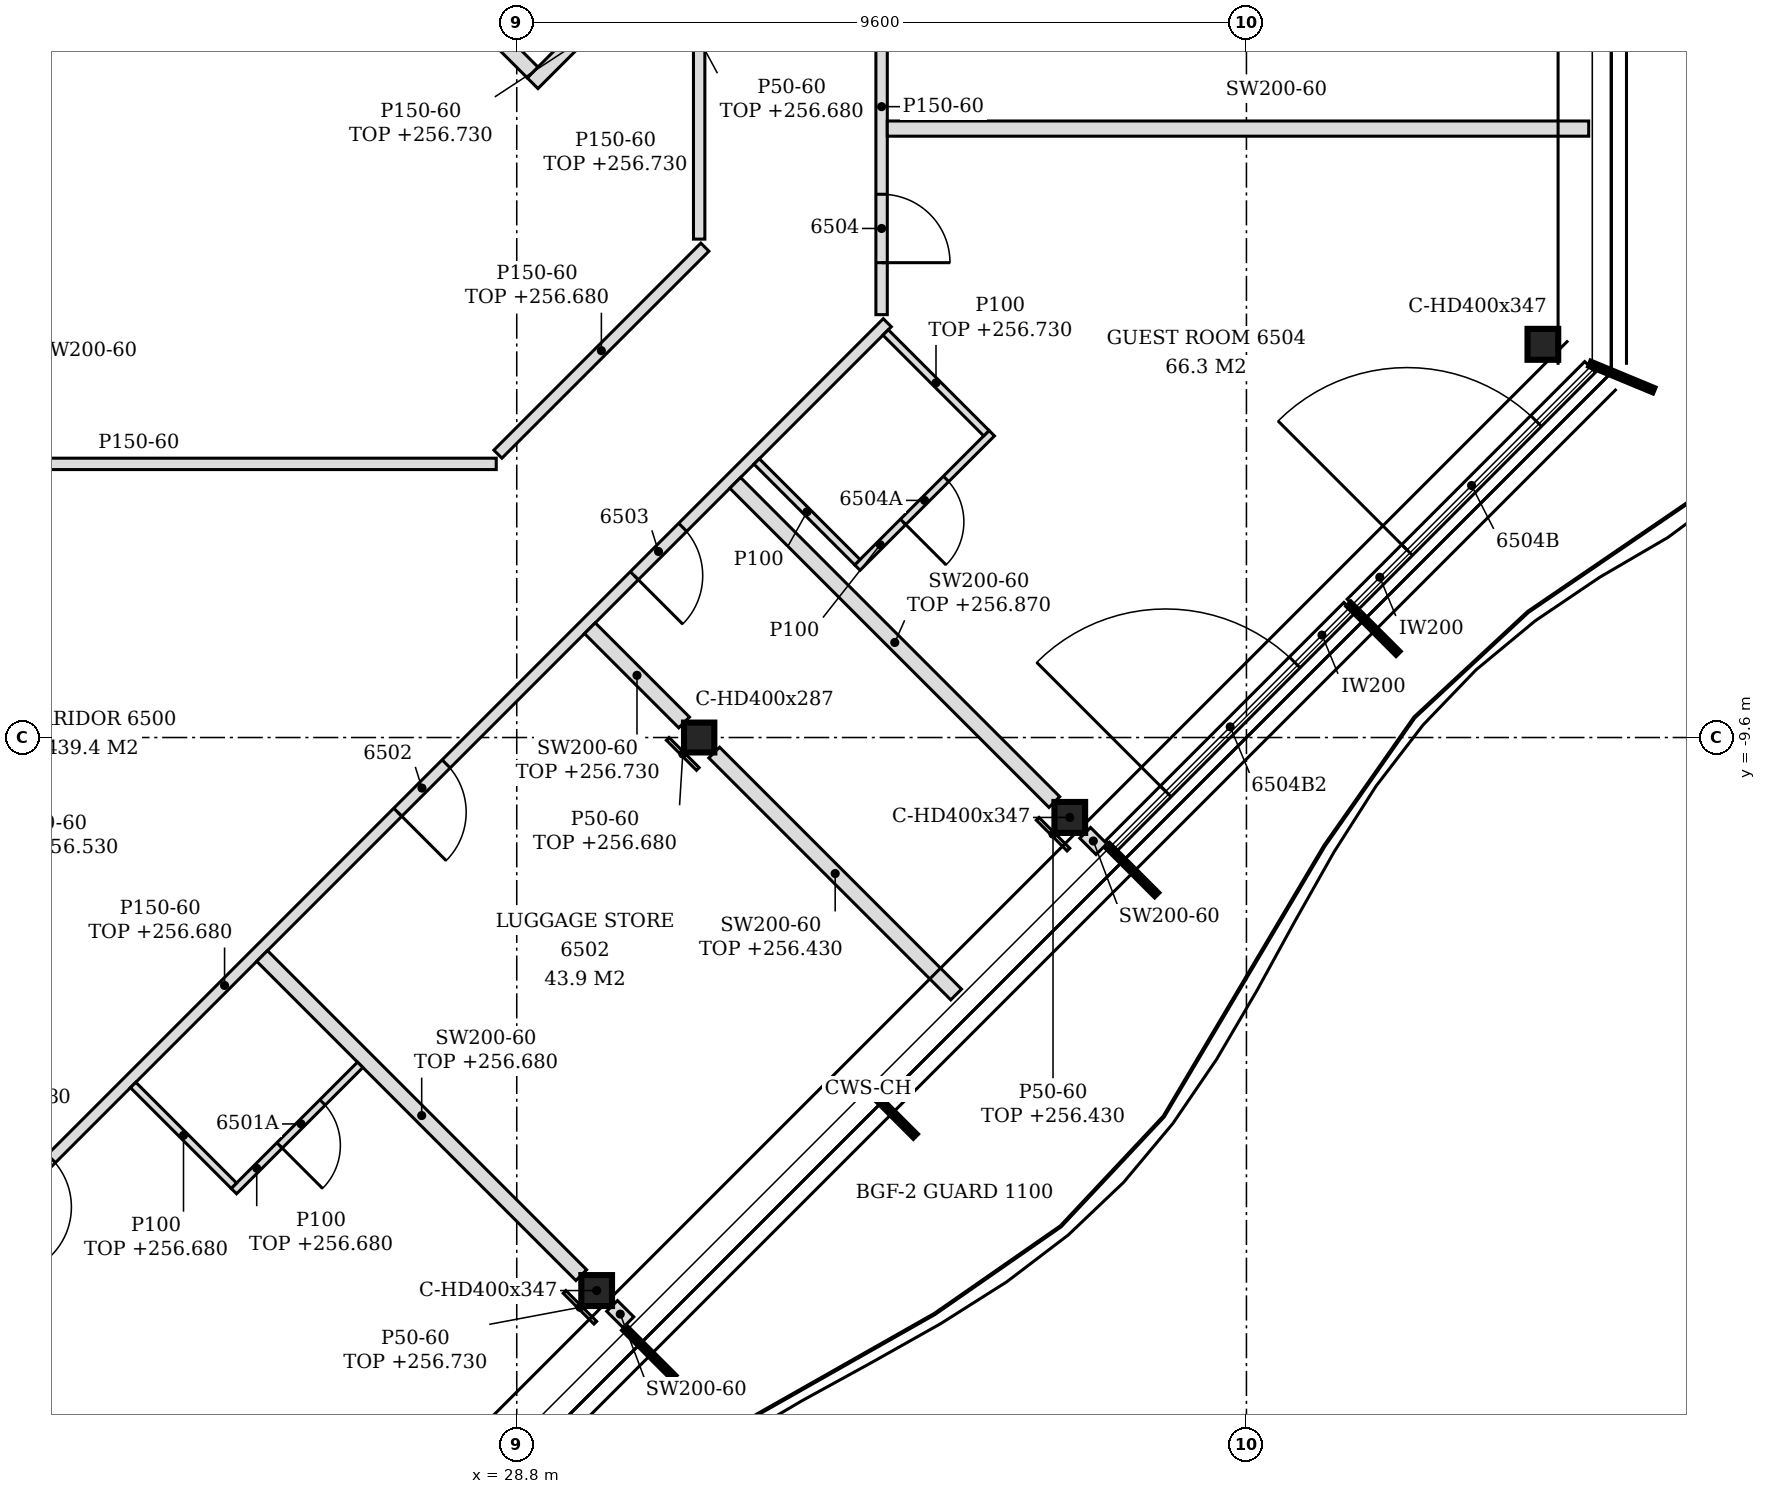
"""IFC4 building model, lengths in metres.
Left out: names, types, materials, properties, quantities, classifications, styles, units other than length and angle.
Written with IfcOpenShell. Run it as: python <this file> out.ifc"""

import sys

from ifc_helpers import new_model, si_unit, direction, frame, frame_2d, origin, origin_2d, place, context, subcontext, project, spatial, polyline, rectangle, i_section, outline, extrude, element, fill, save


model = new_model("IFC4")
c1 = context("Model", 3, precision=1e-05, world=origin(), true_north=direction((0.0, 1.0)))
c2 = subcontext(c1, "Body", "Model", "MODEL_VIEW")
j1 = project(units=[si_unit("LENGTHUNIT", "METRE"), si_unit("PLANEANGLEUNIT", "RADIAN")], contexts=[c1])
p1 = place(None, origin())
s1 = spatial("IfcSite", under=j1, at=p1, CompositionType="ELEMENT")
p2 = place(p1, origin())
s2 = spatial("IfcBuilding", under=s1, at=p2, CompositionType="ELEMENT")
p3 = place(p2, frame((0.0, 0.0, 253.8)))
s3 = spatial("IfcBuildingStorey", under=s2, at=p3, CompositionType="ELEMENT", Elevation=253.8)
for number, where, z_axis, x_axis in (
    (1, (29.852, -16.876, -0.15), (0.0, 0.0, 1.0), (1.0, 0.0, 0.0)),
    (2, (36.076, -10.652, -0.15), (0.0, 0.0, 1.0), (1.0, 0.0, 0.0)),
    (3, (42.3, -4.427, -0.15), (0.0, 0.0, 1.0), (1.0, 0.0, 0.0)),
):
    element("IfcColumn", number, at=place(p3, frame(where, z_axis=z_axis, x_axis=x_axis)), inside=s3, PredefinedType="COLUMN", context=c2, shape_type="SweptSolid", body=[
        extrude(i_section(OverallWidth=0.404, OverallDepth=0.407, WebThickness=0.027, FlangeThickness=0.044, FilletRadius=0.015, at=origin_2d()), origin(), (0.0, 0.0, 1.0), 3.6),
    ])
p4 = place(p3, frame((31.2, -9.6, -0.15), z_axis=(0.0, 0.0, 1.0), x_axis=(1.0, 0.0, 0.0)))
e4 = element("IfcColumn", 4, at=p4, inside=s3, PredefinedType="COLUMN", context=c2, shape_type="SweptSolid", body=[
    extrude(i_section(OverallWidth=0.399, OverallDepth=0.393, WebThickness=0.023, FlangeThickness=0.037, FilletRadius=0.015, at=origin_2d()), origin(), (0.0, 0.0, 1.0), 3.6),
])
p5 = place(p3, frame((36.62, -11.026, 0.0), z_axis=(0.0, 0.0, 1.0), x_axis=(0.707106781187, 0.707106781187, 0.0)))
e5 = element("IfcWall", 5, at=p5, inside=s3, PredefinedType="NOTDEFINED", context=c2, shape_type="SweptSolid", body=[
    extrude(rectangle(XDim=4.431, YDim=0.2, at=frame_2d((2.215, 0.0))), origin(), (0.0, 0.0, 1.0), 3.45),
])
p6 = place(p5, frame((1.015, 0.0, 0.0)))
e6 = element("IfcOpeningElement", 6, at=p6, cuts=e5, PredefinedType="OPENING", context=c2, shape_type="SweptSolid", body=[
    extrude(rectangle(XDim=2.4, YDim=2.4, at=frame_2d((1.2, 1.2))), frame((0.0, 0.11, 0.0), z_axis=(0.0, -1.0, 0.0), x_axis=(1.0, 0.0, 0.0)), (0.0, 0.0, 1.0), 0.22),
])
p7 = place(p3, frame((39.796, -7.851, 0.0), z_axis=(0.0, 0.0, 1.0), x_axis=(0.707079168996, 0.707134392299, 0.0)))
e7 = element("IfcWall", 7, at=p7, inside=s3, PredefinedType="NOTDEFINED", context=c2, shape_type="SweptSolid", body=[
    extrude(rectangle(XDim=4.421, YDim=0.2, at=frame_2d((2.21, 0.0))), origin(), (0.0, 0.0, 1.0), 3.45),
])
p8 = place(p7, frame((1.015, 0.0, 0.0)))
e8 = element("IfcOpeningElement", 8, at=p8, cuts=e7, PredefinedType="OPENING", context=c2, shape_type="SweptSolid", body=[
    extrude(rectangle(XDim=2.4, YDim=2.4, at=frame_2d((1.2, 1.2))), frame((0.0, 0.11, 0.0), z_axis=(0.0, -1.0, 0.0), x_axis=(1.0, 0.0, 0.0)), (0.0, 0.0, 1.0), 0.22),
])
p9 = place(p3, frame((30.269, -17.293, 0.0), z_axis=(0.0, 0.0, 1.0), x_axis=(-0.707509117806, 0.706704215511, 0.0)))
e9 = element("IfcWall", 9, at=p9, inside=s3, PredefinedType="PARTITIONING", context=c2, shape_type="SweptSolid", body=[
    extrude(rectangle(XDim=0.303, YDim=0.2, at=frame_2d((0.152, 0.0))), origin(), (0.0, 0.0, 1.0), 3.45),
])
p10 = place(p3, frame((21.146, -16.672, 0.0), z_axis=(0.0, 0.0, 1.0), x_axis=(0.707106781187, 0.707106781187, 0.0)))
e10 = element("IfcWall", 10, at=p10, inside=s3, PredefinedType="PARTITIONING", context=c2, shape_type="SweptSolid", body=[
    extrude(rectangle(XDim=17.719, YDim=0.15, at=frame_2d((8.859, 0.0))), origin(), (0.0, 0.0, 1.0), 2.88),
])
p11 = place(p10, frame((1.266, 0.0, 0.0)))
e11 = element("IfcOpeningElement", 11, at=p11, cuts=e10, PredefinedType="OPENING", context=c2, shape_type="SweptSolid", body=[
    extrude(rectangle(XDim=0.9, YDim=2.1, at=frame_2d((0.45, 1.05))), frame((0.0, 0.085, 0.0), z_axis=(0.0, -1.0, 0.0), x_axis=(1.0, 0.0, 0.0)), (0.0, 0.0, 1.0), 0.17),
])
p12 = place(p10, frame((8.611, 0.0, 0.0)))
e12 = element("IfcOpeningElement", 12, at=p12, cuts=e10, PredefinedType="OPENING", context=c2, shape_type="SweptSolid", body=[
    extrude(rectangle(XDim=0.9, YDim=2.1, at=frame_2d((0.45, 1.05))), frame((0.0, 0.085, 0.0), z_axis=(0.0, -1.0, 0.0), x_axis=(1.0, 0.0, 0.0)), (0.0, 0.0, 1.0), 0.17),
])
p13 = place(p10, frame((13.012, 0.0, 0.0)))
e13 = element("IfcOpeningElement", 13, at=p13, cuts=e10, PredefinedType="OPENING", context=c2, shape_type="SweptSolid", body=[
    extrude(rectangle(XDim=0.9, YDim=2.1, at=frame_2d((0.45, 1.05))), frame((0.0, 0.085, 0.0), z_axis=(0.0, -1.0, 0.0), x_axis=(1.0, 0.0, 0.0)), (0.0, 0.0, 1.0), 0.17),
])
p14 = place(p3, frame((29.649, -16.673, 0.0), z_axis=(0.0, 0.0, 1.0), x_axis=(-0.70712733811, 0.707086223665, 0.0)))
e14 = element("IfcWall", 14, at=p14, inside=s3, PredefinedType="PARTITIONING", context=c2, shape_type="SweptSolid", body=[
    extrude(rectangle(XDim=5.938, YDim=0.2, at=frame_2d((2.969, 0.0))), origin(), (0.0, 0.0, 1.0), 2.88),
])
p15 = place(p3, frame((25.079, -15.567, 0.0), z_axis=(0.0, 0.0, 1.0), x_axis=(0.707106781187, 0.707106781187, 0.0)))
e15 = element("IfcWall", 15, at=p15, inside=s3, PredefinedType="PARTITIONING", context=c2, shape_type="SweptSolid", body=[
    extrude(rectangle(XDim=2.35, YDim=0.1, at=frame_2d((1.175, 0.0))), origin(), (0.0, 0.0, 1.0), 2.88),
])
p16 = place(p15, frame((0.85, 0.0, 0.0)))
e16 = element("IfcOpeningElement", 16, at=p16, cuts=e15, PredefinedType="OPENING", context=c2, shape_type="SweptSolid", body=[
    extrude(rectangle(XDim=0.8, YDim=2.1, at=frame_2d((0.4, 1.05))), frame((0.0, 0.06, 0.0), z_axis=(0.0, -1.0, 0.0), x_axis=(1.0, 0.0, 0.0)), (0.0, 0.0, 1.0), 0.12),
])
p17 = place(p3, frame((25.079, -15.497, 0.0), z_axis=(0.0, 0.0, 1.0), x_axis=(-0.707106781187, 0.707106781187, 0.0)))
e17 = element("IfcWall", 17, at=p17, inside=s3, PredefinedType="PARTITIONING", context=c2, shape_type="SweptSolid", body=[
    extrude(rectangle(XDim=1.875, YDim=0.1, at=frame_2d((0.938, 0.0))), origin(), (0.0, 0.0, 1.0), 2.88),
])
p18 = place(p3, frame((34.581, -12.981, 0.0), z_axis=(0.0, 0.0, 1.0), x_axis=(-0.707133900936, 0.707079660397, 0.0)))
e18 = element("IfcWall", 18, at=p18, inside=s3, PredefinedType="PARTITIONING", context=c2, shape_type="SweptSolid", body=[
    extrude(rectangle(XDim=4.501, YDim=0.2, at=frame_2d((2.25, 0.0))), origin(), (0.0, 0.0, 1.0), 2.63),
])
p19 = place(p3, frame((36.493, -11.069, 0.0), z_axis=(0.0, 0.0, 1.0), x_axis=(-0.707106781187, 0.707106781187, 0.0)))
e19 = element("IfcWall", 19, at=p19, inside=s3, PredefinedType="PARTITIONING", context=c2, shape_type="SweptSolid", body=[
    extrude(rectangle(XDim=0.303, YDim=0.2, at=frame_2d((0.152, 0.0))), origin(), (0.0, 0.0, 1.0), 3.45),
])
p20 = place(p3, frame((35.873, -10.449, 0.0), z_axis=(0.0, 0.0, 1.0), x_axis=(-0.707086223665, 0.70712733811, 0.0)))
e20 = element("IfcWall", 20, at=p20, inside=s3, PredefinedType="PARTITIONING", context=c2, shape_type="SweptSolid", body=[
    extrude(rectangle(XDim=5.938, YDim=0.2, at=frame_2d((2.969, 0.0))), origin(), (0.0, 0.0, 1.0), 3.07),
])
p21 = place(p3, frame((31.002, -9.402, 0.0), z_axis=(0.0, 0.0, 1.0), x_axis=(-0.707106781187, 0.707106781187, 0.0)))
e21 = element("IfcWall", 21, at=p21, inside=s3, PredefinedType="PARTITIONING", context=c2, shape_type="SweptSolid", body=[
    extrude(rectangle(XDim=1.754, YDim=0.2, at=frame_2d((0.877, 0.0))), origin(), (0.0, 0.0, 1.0), 2.93),
])
p22 = place(p3, frame((33.281, -7.365, 0.0), z_axis=(0.0, 0.0, 1.0), x_axis=(0.707106781187, 0.707106781187, 0.0)))
e22 = element("IfcWall", 22, at=p22, inside=s3, PredefinedType="PARTITIONING", context=c2, shape_type="SweptSolid", body=[
    extrude(rectangle(XDim=2.5, YDim=0.1, at=frame_2d((1.25, 0.0))), origin(), (0.0, 0.0, 1.0), 3.45),
])
p23 = place(p22, frame((0.85, 0.0, 0.0)))
e23 = element("IfcOpeningElement", 23, at=p23, cuts=e22, PredefinedType="OPENING", context=c2, shape_type="SweptSolid", body=[
    extrude(rectangle(XDim=0.8, YDim=2.1, at=frame_2d((0.4, 1.05))), frame((0.0, 0.06, 0.0), z_axis=(0.0, -1.0, 0.0), x_axis=(1.0, 0.0, 0.0)), (0.0, 0.0, 1.0), 0.12),
])
p24 = place(p3, frame((33.281, -7.294, 0.0), z_axis=(0.0, 0.0, 1.0), x_axis=(-0.707041661071, 0.707171895306, 0.0)))
e24 = element("IfcWall", 24, at=p24, inside=s3, PredefinedType="PARTITIONING", context=c2, shape_type="SweptSolid", body=[
    extrude(rectangle(XDim=1.875, YDim=0.1, at=frame_2d((0.937, 0.0))), origin(), (0.0, 0.0, 1.0), 3.45),
])
p25 = place(p3, frame((19.125, -6.0, 0.0), z_axis=(0.0, 0.0, 1.0), x_axis=(1.0, 0.0, 0.0)))
e25 = element("IfcWall", 25, at=p25, inside=s3, PredefinedType="PARTITIONING", context=c2, shape_type="SweptSolid", body=[
    extrude(outline(polyline([(0.0, 0.0), (9.405, 0.0), (9.405, 3.45), (0.225, 3.45), (0.223, 2.83), (0.0, 2.83), (0.0, 0.0)])), frame((0.0, 0.075, 0.0), z_axis=(0.0, -1.0, 0.0), x_axis=(1.0, 0.0, 0.0)), (0.0, 0.0, 1.0), 0.15),
])
p26 = place(p3, frame((28.552, -5.872, 0.0), z_axis=(0.0, 0.0, 1.0), x_axis=(0.707075081602, 0.70713847935, 0.0)))
e26 = element("IfcWall", 26, at=p26, inside=s3, PredefinedType="PARTITIONING", context=c2, shape_type="SweptSolid", body=[
    extrude(rectangle(XDim=3.851, YDim=0.15, at=frame_2d((1.925, 0.0))), origin(), (0.0, 0.0, 1.0), 2.88),
])
p27 = place(p3, frame((34.979, -5.597, 0.0), z_axis=(0.0, 0.0, 1.0), x_axis=(-0.707041661071, 0.707171895306, 0.0)))
e27 = element("IfcWall", 27, at=p27, inside=s3, PredefinedType="PARTITIONING", context=c2, shape_type="SweptSolid", body=[
    extrude(rectangle(XDim=1.875, YDim=0.1, at=frame_2d((0.937, 0.0))), origin(), (0.0, 0.0, 1.0), 2.93),
])
p28 = place(p3, frame((33.6, -4.037, 0.0), z_axis=(0.0, 0.0, 1.0), x_axis=(0.0, 1.0, 0.0)))
e28 = element("IfcWall", 28, at=p28, inside=s3, PredefinedType="PARTITIONING", context=c2, shape_type="SweptSolid", body=[
    extrude(outline(polyline([(0.0, 0.0), (6.337, 0.0), (6.337, 3.45), (4.142, 3.45), (4.14, 2.88), (3.932, 2.88), (3.93, 3.45), (0.0, 3.45), (0.0, 0.0)])), frame((0.0, 0.075, 0.0), z_axis=(0.0, -1.0, 0.0), x_axis=(1.0, 0.0, 0.0)), (0.0, 0.0, 1.0), 0.15),
])
p29 = place(p28, frame((0.684, 0.0, 0.0)))
e29 = element("IfcOpeningElement", 29, at=p29, cuts=e28, PredefinedType="OPENING", context=c2, shape_type="SweptSolid", body=[
    extrude(rectangle(XDim=0.9, YDim=2.1, at=frame_2d((0.45, 1.05))), frame((0.0, 0.085, 0.0), z_axis=(0.0, -1.0, 0.0), x_axis=(1.0, 0.0, 0.0)), (0.0, 0.0, 1.0), 0.17),
])
p30 = place(p28, frame((3.889, 0.0, 0.0)))
e30 = element("IfcOpeningElement", 30, at=p30, cuts=e28, PredefinedType="OPENING", context=c2, shape_type="SweptSolid", body=[
    extrude(rectangle(XDim=0.9, YDim=2.1, at=frame_2d((0.45, 1.05))), frame((0.0, 0.085, 0.0), z_axis=(0.0, -1.0, 0.0), x_axis=(1.0, 0.0, 0.0)), (0.0, 0.0, 1.0), 0.17),
])
p31 = place(p3, frame((31.2, -3.043, 0.0), z_axis=(0.0, 0.0, 1.0), x_axis=(0.0, 1.0, 0.0)))
e31 = element("IfcWall", 31, at=p31, inside=s3, PredefinedType="PARTITIONING", context=c2, shape_type="SweptSolid", body=[
    extrude(rectangle(XDim=2.846, YDim=0.15, at=frame_2d((1.423, 0.0))), origin(), (0.0, 0.0, 1.0), 2.93),
])
p32 = place(p3, frame((33.675, -1.589, 0.0), z_axis=(0.0, 0.0, 1.0), x_axis=(1.0, 0.0, 0.0)))
e32 = element("IfcWall", 32, at=p32, inside=s3, PredefinedType="PARTITIONING", context=c2, shape_type="SweptSolid", body=[
    extrude(outline(polyline([(0.0, 0.0), (9.228, 0.0), (9.228, 3.45), (8.775, 3.45), (8.773, 2.93), (8.475, 2.93), (8.473, 3.45), (0.0, 3.45), (0.0, 0.0)])), frame((0.0, 0.1, 0.0), z_axis=(0.0, -1.0, 0.0), x_axis=(1.0, 0.0, 0.0)), (0.0, 0.0, 1.0), 0.2),
])
p33 = place(p3, frame((29.008, -0.992, 0.0), z_axis=(0.0, 0.0, 1.0), x_axis=(0.707106781187, 0.707106781187, 0.0)))
e33 = element("IfcWall", 33, at=p33, inside=s3, PredefinedType="PARTITIONING", context=c2, shape_type="SweptSolid", body=[
    extrude(rectangle(XDim=3.216, YDim=0.2, at=frame_2d((1.608, 0.0))), origin(), (0.0, 0.0, 1.0), 2.88),
])
p34 = place(p3, frame((29.008, -0.85, 0.0), z_axis=(0.0, 0.0, 1.0), x_axis=(-0.707042536715, 0.707171019822, 0.0)))
e34 = element("IfcWall", 34, at=p34, inside=s3, PredefinedType="PARTITIONING", context=c2, shape_type="SweptSolid", body=[
    extrude(rectangle(XDim=1.9, YDim=0.2, at=frame_2d((0.95, 0.0))), origin(), (0.0, 0.0, 1.0), 2.88),
])
p35 = place(p3, frame((29.834, -17.299, 0.0), z_axis=(0.0, 0.0, 1.0), x_axis=(-0.707106781187, 0.707106781187, 0.0)))
e35 = element("IfcWall", 35, at=p35, inside=s3, PredefinedType="PARTITIONING", context=c2, shape_type="SweptSolid", body=[
    extrude(rectangle(XDim=0.573, YDim=0.05, at=frame_2d((0.287, 0.0))), origin(), (0.0, 0.0, 1.0), 2.93),
])
p36 = place(p3, frame((31.182, -10.014, 0.0), z_axis=(0.0, 0.0, 1.0), x_axis=(-0.707106781187, 0.707106781187, 0.0)))
e36 = element("IfcWall", 36, at=p36, inside=s3, PredefinedType="PARTITIONING", context=c2, shape_type="SweptSolid", body=[
    extrude(rectangle(XDim=0.56, YDim=0.05, at=frame_2d((0.28, 0.0))), origin(), (0.0, 0.0, 1.0), 2.88),
])
p37 = place(p3, frame((36.058, -11.075, 0.0), z_axis=(0.0, 0.0, 1.0), x_axis=(-0.707106781187, 0.707106781187, 0.0)))
e37 = element("IfcWall", 37, at=p37, inside=s3, PredefinedType="PARTITIONING", context=c2, shape_type="SweptSolid", body=[
    extrude(rectangle(XDim=0.573, YDim=0.05, at=frame_2d((0.287, 0.0))), origin(), (0.0, 0.0, 1.0), 2.63),
])
p38 = place(p6, origin())
e38 = element("IfcDoor", 38, at=p38, inside=s3, OperationType="SINGLE_SWING_LEFT", PredefinedType="DOOR", context=c2, shape_type="SweptSolid", body=[
    extrude(rectangle(XDim=2.4, YDim=2.4, at=frame_2d((1.2, 1.2))), frame((0.0, 0.025, 0.0), z_axis=(0.0, -1.0, 0.0), x_axis=(1.0, 0.0, 0.0)), (0.0, 0.0, 1.0), 0.05),
])
fill(e6, e38)
p39 = place(p8, origin())
e39 = element("IfcDoor", 39, at=p39, inside=s3, OperationType="SINGLE_SWING_LEFT", PredefinedType="DOOR", context=c2, shape_type="SweptSolid", body=[
    extrude(rectangle(XDim=2.4, YDim=2.4, at=frame_2d((1.2, 1.2))), frame((0.0, 0.025, 0.0), z_axis=(0.0, -1.0, 0.0), x_axis=(1.0, 0.0, 0.0)), (0.0, 0.0, 1.0), 0.05),
])
fill(e8, e39)
p40 = place(p16, frame((0.8, 0.0, 0.0), z_axis=(0.0, 0.0, 1.0), x_axis=(-1.0, 0.0, 0.0)))
e40 = element("IfcDoor", 40, at=p40, inside=s3, OperationType="SINGLE_SWING_RIGHT", PredefinedType="DOOR", context=c2, shape_type="SweptSolid", body=[
    extrude(rectangle(XDim=0.8, YDim=2.1, at=frame_2d((0.4, 1.05))), frame((0.0, 0.025, 0.0), z_axis=(0.0, -1.0, 0.0), x_axis=(1.0, 0.0, 0.0)), (0.0, 0.0, 1.0), 0.05),
])
fill(e16, e40)
p41 = place(p12, frame((0.9, 0.0, 0.0), z_axis=(0.0, 0.0, 1.0), x_axis=(-1.0, 0.0, 0.0)))
e41 = element("IfcDoor", 41, at=p41, inside=s3, OperationType="SINGLE_SWING_RIGHT", PredefinedType="DOOR", context=c2, shape_type="SweptSolid", body=[
    extrude(rectangle(XDim=0.9, YDim=2.1, at=frame_2d((0.45, 1.05))), frame((0.0, 0.025, 0.0), z_axis=(0.0, -1.0, 0.0), x_axis=(1.0, 0.0, 0.0)), (0.0, 0.0, 1.0), 0.05),
])
fill(e12, e41)
p42 = place(p13, frame((0.9, 0.0, 0.0), z_axis=(0.0, 0.0, 1.0), x_axis=(-1.0, 0.0, 0.0)))
e42 = element("IfcDoor", 42, at=p42, inside=s3, OperationType="SINGLE_SWING_RIGHT", PredefinedType="DOOR", context=c2, shape_type="SweptSolid", body=[
    extrude(rectangle(XDim=0.9, YDim=2.1, at=frame_2d((0.45, 1.05))), frame((0.0, 0.025, 0.0), z_axis=(0.0, -1.0, 0.0), x_axis=(1.0, 0.0, 0.0)), (0.0, 0.0, 1.0), 0.05),
])
fill(e13, e42)
p43 = place(p29, frame((0.9, 0.0, 0.0), z_axis=(0.0, 0.0, 1.0), x_axis=(-1.0, 0.0, 0.0)))
e43 = element("IfcDoor", 43, at=p43, inside=s3, OperationType="SINGLE_SWING_RIGHT", PredefinedType="DOOR", context=c2, shape_type="SweptSolid", body=[
    extrude(rectangle(XDim=0.9, YDim=2.1, at=frame_2d((0.45, 1.05))), frame((0.0, 0.025, 0.0), z_axis=(0.0, -1.0, 0.0), x_axis=(1.0, 0.0, 0.0)), (0.0, 0.0, 1.0), 0.05),
])
fill(e29, e43)
p44 = place(p23, frame((0.8, 0.0, 0.0), z_axis=(0.0, 0.0, 1.0), x_axis=(-1.0, 0.0, 0.0)))
e44 = element("IfcDoor", 44, at=p44, inside=s3, OperationType="SINGLE_SWING_RIGHT", PredefinedType="DOOR", context=c2, shape_type="SweptSolid", body=[
    extrude(rectangle(XDim=0.8, YDim=2.1, at=frame_2d((0.4, 1.05))), frame((0.0, 0.025, 0.0), z_axis=(0.0, -1.0, 0.0), x_axis=(1.0, 0.0, 0.0)), (0.0, 0.0, 1.0), 0.05),
])
fill(e23, e44)
save(model, sys.argv[1])
